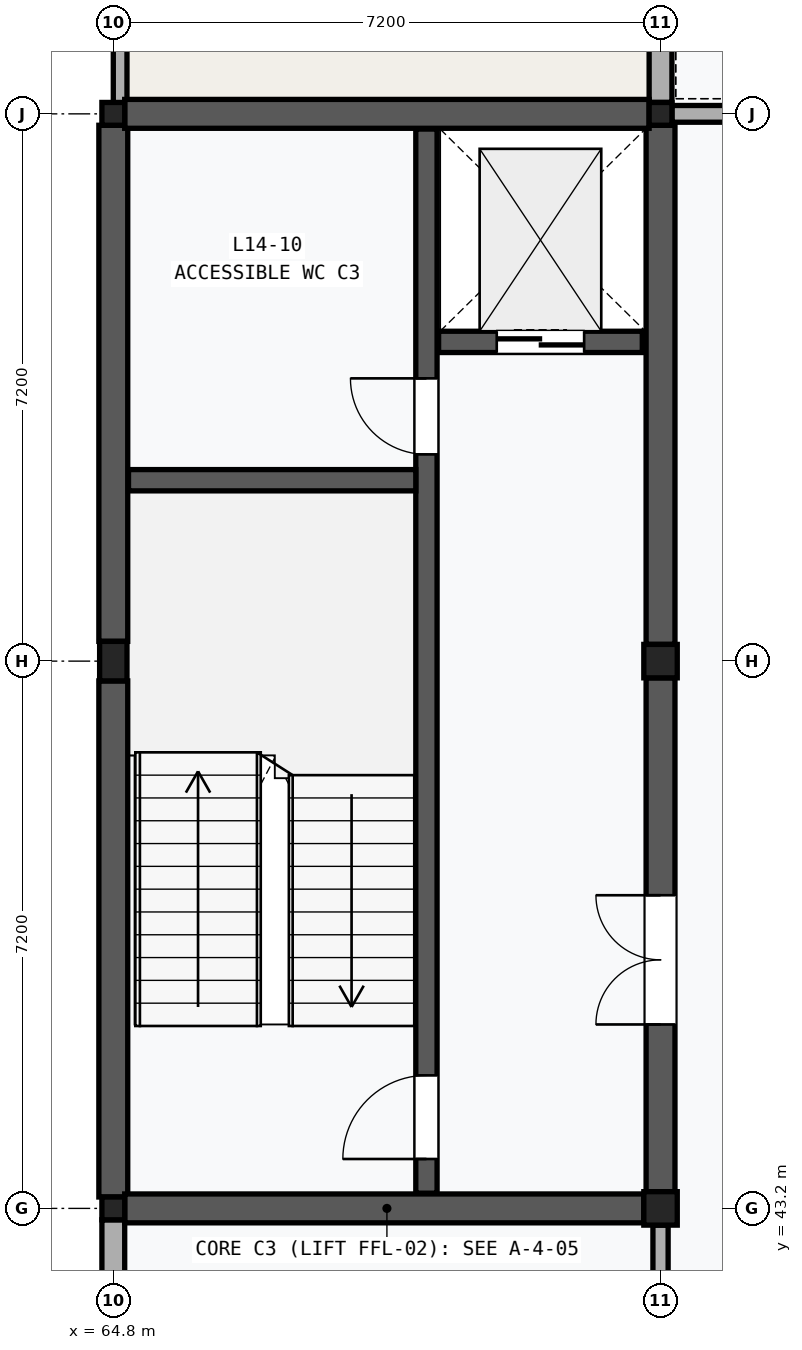
"""IFC4 building model, lengths in metres.
Left out: names, types, materials, properties, quantities, classifications, styles, units other than length and angle.
Written with IfcOpenShell. Run it as: python <this file> out.ifc"""

import sys

from ifc_helpers import new_model, si_unit, direction, frame, frame_2d, origin, origin_2d, place, context, subcontext, project, spatial, rectangle, extrude, element, fill, save


model = new_model("IFC4")
c1 = context("Model", 3, precision=1e-05, world=origin(), true_north=direction((0.0, 1.0)))
c2 = subcontext(c1, "Body", "Model", "MODEL_VIEW")
j1 = project(units=[si_unit("LENGTHUNIT", "METRE"), si_unit("PLANEANGLEUNIT", "RADIAN")], contexts=[c1])
p1 = place(None, origin())
s1 = spatial("IfcSite", under=j1, at=p1, CompositionType="ELEMENT")
p2 = place(p1, origin())
s2 = spatial("IfcBuilding", under=s1, at=p2, CompositionType="ELEMENT")
p3 = place(p2, frame((0.0, 0.0, 59.0)))
s3 = spatial("IfcBuildingStorey", under=s2, at=p3, CompositionType="ELEMENT", Elevation=59.0)
p4 = place(p3, frame((64.8, 43.2, 0.0), z_axis=(0.0, 0.0, 1.0), x_axis=(1.0, 0.0, 0.0)))
e1 = element("IfcColumn", 1, at=p4, inside=s3, PredefinedType="COLUMN", context=c2, shape_type="SweptSolid", body=[
    extrude(rectangle(XDim=0.3, YDim=0.3, at=origin_2d()), origin(), (0.0, 0.0, 1.0), 4.0),
])
p5 = place(p3, frame((64.8, 50.4, 0.0), z_axis=(0.0, 0.0, 1.0), x_axis=(1.0, 0.0, 0.0)))
e2 = element("IfcColumn", 2, at=p5, inside=s3, PredefinedType="PILASTER", context=c2, shape_type="SweptSolid", body=[
    extrude(rectangle(XDim=0.36, YDim=0.52, at=origin_2d()), origin(), (0.0, 0.0, 1.0), 4.0),
])
p6 = place(p3, frame((64.8, 57.6, 0.0), z_axis=(0.0, 0.0, 1.0), x_axis=(1.0, 0.0, 0.0)))
e3 = element("IfcColumn", 3, at=p6, inside=s3, PredefinedType="COLUMN", context=c2, shape_type="SweptSolid", body=[
    extrude(rectangle(XDim=0.3, YDim=0.3, at=origin_2d()), origin(), (0.0, 0.0, 1.0), 4.0),
])
for number, where, z_axis, x_axis in (
    (4, (72.0, 43.2, 0.0), (0.0, 0.0, 1.0), (1.0, 0.0, 0.0)),
    (5, (72.0, 50.4, 0.0), (0.0, 0.0, 1.0), (1.0, 0.0, 0.0)),
):
    element("IfcColumn", number, at=place(p3, frame(where, z_axis=z_axis, x_axis=x_axis)), inside=s3, PredefinedType="COLUMN", context=c2, shape_type="SweptSolid", body=[
        extrude(rectangle(XDim=0.44, YDim=0.44, at=origin_2d()), origin(), (0.0, 0.0, 1.0), 4.0),
    ])
p7 = place(p3, frame((72.0, 57.6, 0.0), z_axis=(0.0, 0.0, 1.0), x_axis=(1.0, 0.0, 0.0)))
e6 = element("IfcColumn", 6, at=p7, inside=s3, PredefinedType="COLUMN", context=c2, shape_type="SweptSolid", body=[
    extrude(rectangle(XDim=0.3, YDim=0.3, at=origin_2d()), origin(), (0.0, 0.0, 1.0), 4.0),
])
p8 = place(p3, frame((64.8, 36.15, 0.0), z_axis=(0.0, 0.0, 1.0), x_axis=(0.0, 1.0, 0.0)))
e7 = element("IfcWall", 7, at=p8, inside=s3, PredefinedType="SOLIDWALL", context=c2, shape_type="SweptSolid", body=[
    extrude(rectangle(XDim=6.9, YDim=0.3, at=frame_2d((3.45, 0.0))), origin(), (0.0, 0.0, 1.0), 3.19),
])
p9 = place(p3, frame((72.0, 57.75, 0.0), z_axis=(0.0, 0.0, 1.0), x_axis=(0.0, 1.0, 0.0)))
e8 = element("IfcWall", 8, at=p9, inside=s3, PredefinedType="SOLIDWALL", context=c2, shape_type="SweptSolid", body=[
    extrude(rectangle(XDim=6.9, YDim=0.3, at=frame_2d((3.45, 0.0))), origin(), (0.0, 0.0, 1.0), 3.19),
])
p10 = place(p9, frame((2.25, 0.0, 0.85)))
e9 = element("IfcOpeningElement", 9, at=p10, cuts=e8, PredefinedType="OPENING", context=c2, shape_type="SweptSolid", body=[
    extrude(rectangle(XDim=2.4, YDim=2.0, at=frame_2d((1.2, 1.0))), frame((0.0, 0.162, 0.0), z_axis=(0.0, -1.0, 0.0), x_axis=(1.0, 0.0, 0.0)), (0.0, 0.0, 1.0), 0.324),
])
p11 = place(p3, frame((64.89, 57.69, 0.0), z_axis=(0.0, 0.0, 1.0), x_axis=(0.0, 1.0, 0.0)))
e10 = element("IfcWall", 10, at=p11, inside=s3, PredefinedType="PARAPET", context=c2, shape_type="SweptSolid", body=[
    extrude(rectangle(XDim=7.02, YDim=0.18, at=frame_2d((3.51, 0.0))), origin(), (0.0, 0.0, 1.0), 0.95),
])
p12 = place(p3, frame((64.8, 43.35, 0.0), z_axis=(0.0, 0.0, 1.0), x_axis=(0.0, 1.0, 0.0)))
e11 = element("IfcWall", 11, at=p12, inside=s3, PredefinedType="SHEAR", context=c2, shape_type="SweptSolid", body=[
    extrude(rectangle(XDim=6.79, YDim=0.38, at=frame_2d((3.395, 0.0))), origin(), (0.0, 0.0, 1.0), 3.19),
])
p13 = place(p3, frame((64.8, 50.66, 0.0), z_axis=(0.0, 0.0, 1.0), x_axis=(0.0, 1.0, 0.0)))
e12 = element("IfcWall", 12, at=p13, inside=s3, PredefinedType="SHEAR", context=c2, shape_type="SweptSolid", body=[
    extrude(rectangle(XDim=6.79, YDim=0.38, at=frame_2d((3.395, 0.0))), origin(), (0.0, 0.0, 1.0), 3.19),
])
p14 = place(p3, frame((72.0, 43.42, 0.0), z_axis=(0.0, 0.0, 1.0), x_axis=(0.0, 1.0, 0.0)))
e13 = element("IfcWall", 13, at=p14, inside=s3, PredefinedType="SHEAR", context=c2, shape_type="SweptSolid", body=[
    extrude(rectangle(XDim=6.76, YDim=0.38, at=frame_2d((3.38, 0.0))), origin(), (0.0, 0.0, 1.0), 3.11),
])
p15 = place(p14, frame((2.2, 0.0, 0.0)))
e14 = element("IfcOpeningElement", 14, at=p15, cuts=e13, PredefinedType="OPENING", context=c2, shape_type="SweptSolid", body=[
    extrude(rectangle(XDim=1.7, YDim=2.25, at=frame_2d((0.85, 1.125))), frame((0.0, 0.202, 0.0), z_axis=(0.0, -1.0, 0.0), x_axis=(1.0, 0.0, 0.0)), (0.0, 0.0, 1.0), 0.404),
])
p16 = place(p3, frame((72.0, 50.62, 0.0), z_axis=(0.0, 0.0, 1.0), x_axis=(0.0, 1.0, 0.0)))
e15 = element("IfcWall", 15, at=p16, inside=s3, PredefinedType="SHEAR", context=c2, shape_type="SweptSolid", body=[
    extrude(rectangle(XDim=6.83, YDim=0.38, at=frame_2d((3.415, 0.0))), origin(), (0.0, 0.0, 1.0), 3.11),
])
p17 = place(p3, frame((64.95, 43.2, 0.0), z_axis=(0.0, 0.0, 1.0), x_axis=(1.0, 0.0, 0.0)))
e16 = element("IfcWall", 16, at=p17, inside=s3, PredefinedType="SHEAR", context=c2, shape_type="SweptSolid", body=[
    extrude(rectangle(XDim=6.83, YDim=0.38, at=frame_2d((3.415, 0.0))), origin(), (0.0, 0.0, 1.0), 3.11),
])
p18 = place(p3, frame((64.95, 57.6, 0.0), z_axis=(0.0, 0.0, 1.0), x_axis=(1.0, 0.0, 0.0)))
e17 = element("IfcWall", 17, at=p18, inside=s3, PredefinedType="SHEAR", context=c2, shape_type="SweptSolid", body=[
    extrude(rectangle(XDim=6.9, YDim=0.38, at=frame_2d((3.45, 0.0))), origin(), (0.0, 0.0, 1.0), 3.19),
])
p19 = place(p3, frame((68.92, 43.4, 0.0), z_axis=(0.0, 0.0, 1.0), x_axis=(0.0, 1.0, 0.0)))
e18 = element("IfcWall", 18, at=p19, inside=s3, PredefinedType="SHEAR", context=c2, shape_type="SweptSolid", body=[
    extrude(rectangle(XDim=14.0, YDim=0.28, at=frame_2d((7.0, 0.0))), origin(), (0.0, 0.0, 1.0), 3.76),
])
p20 = place(p19, frame((0.45, 0.0, 0.0)))
e19 = element("IfcOpeningElement", 19, at=p20, cuts=e18, PredefinedType="OPENING", context=c2, shape_type="SweptSolid", body=[
    extrude(rectangle(XDim=1.1, YDim=2.15, at=frame_2d((0.55, 1.075))), frame((0.0, 0.152, 0.0), z_axis=(0.0, -1.0, 0.0), x_axis=(1.0, 0.0, 0.0)), (0.0, 0.0, 1.0), 0.304),
])
p21 = place(p19, frame((9.72, 0.0, 0.0)))
e20 = element("IfcOpeningElement", 20, at=p21, cuts=e18, PredefinedType="OPENING", context=c2, shape_type="SweptSolid", body=[
    extrude(rectangle(XDim=1.0, YDim=2.15, at=frame_2d((0.5, 1.075))), frame((0.0, 0.152, 0.0), z_axis=(0.0, -1.0, 0.0), x_axis=(1.0, 0.0, 0.0)), (0.0, 0.0, 1.0), 0.304),
])
p22 = place(p3, frame((65.0, 52.78, 0.0), z_axis=(0.0, 0.0, 1.0), x_axis=(1.0, 0.0, 0.0)))
e21 = element("IfcWall", 21, at=p22, inside=s3, PredefinedType="SHEAR", context=c2, shape_type="SweptSolid", body=[
    extrude(rectangle(XDim=3.78, YDim=0.28, at=frame_2d((1.89, 0.0))), origin(), (0.0, 0.0, 1.0), 3.76),
])
p23 = place(p3, frame((69.08, 54.6, 0.0), z_axis=(0.0, 0.0, 1.0), x_axis=(1.0, 0.0, 0.0)))
e22 = element("IfcWall", 22, at=p23, inside=s3, PredefinedType="SHEAR", context=c2, shape_type="SweptSolid", body=[
    extrude(rectangle(XDim=2.68, YDim=0.28, at=frame_2d((1.34, 0.0))), origin(), (0.0, 0.0, 1.0), 3.76),
])
p24 = place(p23, frame((0.765, 0.0, 0.0)))
e23 = element("IfcOpeningElement", 23, at=p24, cuts=e22, PredefinedType="OPENING", context=c2, shape_type="SweptSolid", body=[
    extrude(rectangle(XDim=1.15, YDim=2.2, at=frame_2d((0.575, 1.1))), frame((0.0, 0.152, 0.0), z_axis=(0.0, -1.0, 0.0), x_axis=(1.0, 0.0, 0.0)), (0.0, 0.0, 1.0), 0.304),
])
p25 = place(p3, frame((72.15, 57.6, 0.0), z_axis=(0.0, 0.0, 1.0), x_axis=(1.0, 0.0, 0.0)))
e24 = element("IfcWall", 24, at=p25, inside=s3, PredefinedType="PARTITIONING", context=c2, shape_type="SweptSolid", body=[
    extrude(rectangle(XDim=6.83, YDim=0.22, at=frame_2d((3.415, 0.0))), origin(), (0.0, 0.0, 1.0), 3.11),
])
p26 = place(p25, frame((2.855, 0.0, 0.0)))
e25 = element("IfcOpeningElement", 25, at=p26, cuts=e24, PredefinedType="OPENING", context=c2, shape_type="SweptSolid", body=[
    extrude(rectangle(XDim=1.12, YDim=2.2, at=frame_2d((0.56, 1.1))), frame((0.0, 0.122, 0.0), z_axis=(0.0, -1.0, 0.0), x_axis=(1.0, 0.0, 0.0)), (0.0, 0.0, 1.0), 0.244),
])
p27 = place(p3, frame((72.0, 36.22, 0.0), z_axis=(0.0, 0.0, 1.0), x_axis=(0.0, 1.0, 0.0)))
e26 = element("IfcWall", 26, at=p27, inside=s3, PredefinedType="PARTITIONING", context=c2, shape_type="SweptSolid", body=[
    extrude(rectangle(XDim=6.76, YDim=0.2, at=frame_2d((3.38, 0.0))), origin(), (0.0, 0.0, 1.0), 3.11),
])
p28 = place(p15, origin())
e27 = element("IfcDoor", 27, at=p28, inside=s3, OperationType="DOUBLE_DOOR_SINGLE_SWING", PredefinedType="DOOR", context=c2, shape_type="SweptSolid", body=[
    extrude(rectangle(XDim=1.7, YDim=2.25, at=frame_2d((0.85, 1.125))), frame((0.0, 0.025, 0.0), z_axis=(0.0, -1.0, 0.0), x_axis=(1.0, 0.0, 0.0)), (0.0, 0.0, 1.0), 0.05),
])
fill(e14, e27)
p29 = place(p20, origin())
e28 = element("IfcDoor", 28, at=p29, inside=s3, OperationType="SINGLE_SWING_LEFT", PredefinedType="DOOR", context=c2, shape_type="SweptSolid", body=[
    extrude(rectangle(XDim=1.1, YDim=2.15, at=frame_2d((0.55, 1.075))), frame((0.0, 0.025, 0.0), z_axis=(0.0, -1.0, 0.0), x_axis=(1.0, 0.0, 0.0)), (0.0, 0.0, 1.0), 0.05),
])
fill(e19, e28)
p30 = place(p21, origin())
e29 = element("IfcDoor", 29, at=p30, inside=s3, OperationType="SINGLE_SWING_RIGHT", PredefinedType="DOOR", context=c2, shape_type="SweptSolid", body=[
    extrude(rectangle(XDim=1.0, YDim=2.15, at=frame_2d((0.5, 1.075))), frame((0.0, 0.025, 0.0), z_axis=(0.0, -1.0, 0.0), x_axis=(1.0, 0.0, 0.0)), (0.0, 0.0, 1.0), 0.05),
])
fill(e20, e29)
p31 = place(p24, frame((1.15, 0.0, 0.0), z_axis=(0.0, 0.0, 1.0), x_axis=(-1.0, 0.0, 0.0)))
e30 = element("IfcDoor", 30, at=p31, inside=s3, OperationType="DOUBLE_DOOR_SLIDING", PredefinedType="DOOR", context=c2, shape_type="SweptSolid", body=[
    extrude(rectangle(XDim=1.15, YDim=2.2, at=frame_2d((0.575, 1.1))), frame((0.0, 0.025, 0.0), z_axis=(0.0, -1.0, 0.0), x_axis=(1.0, 0.0, 0.0)), (0.0, 0.0, 1.0), 0.05),
])
fill(e23, e30)
save(model, sys.argv[1])
